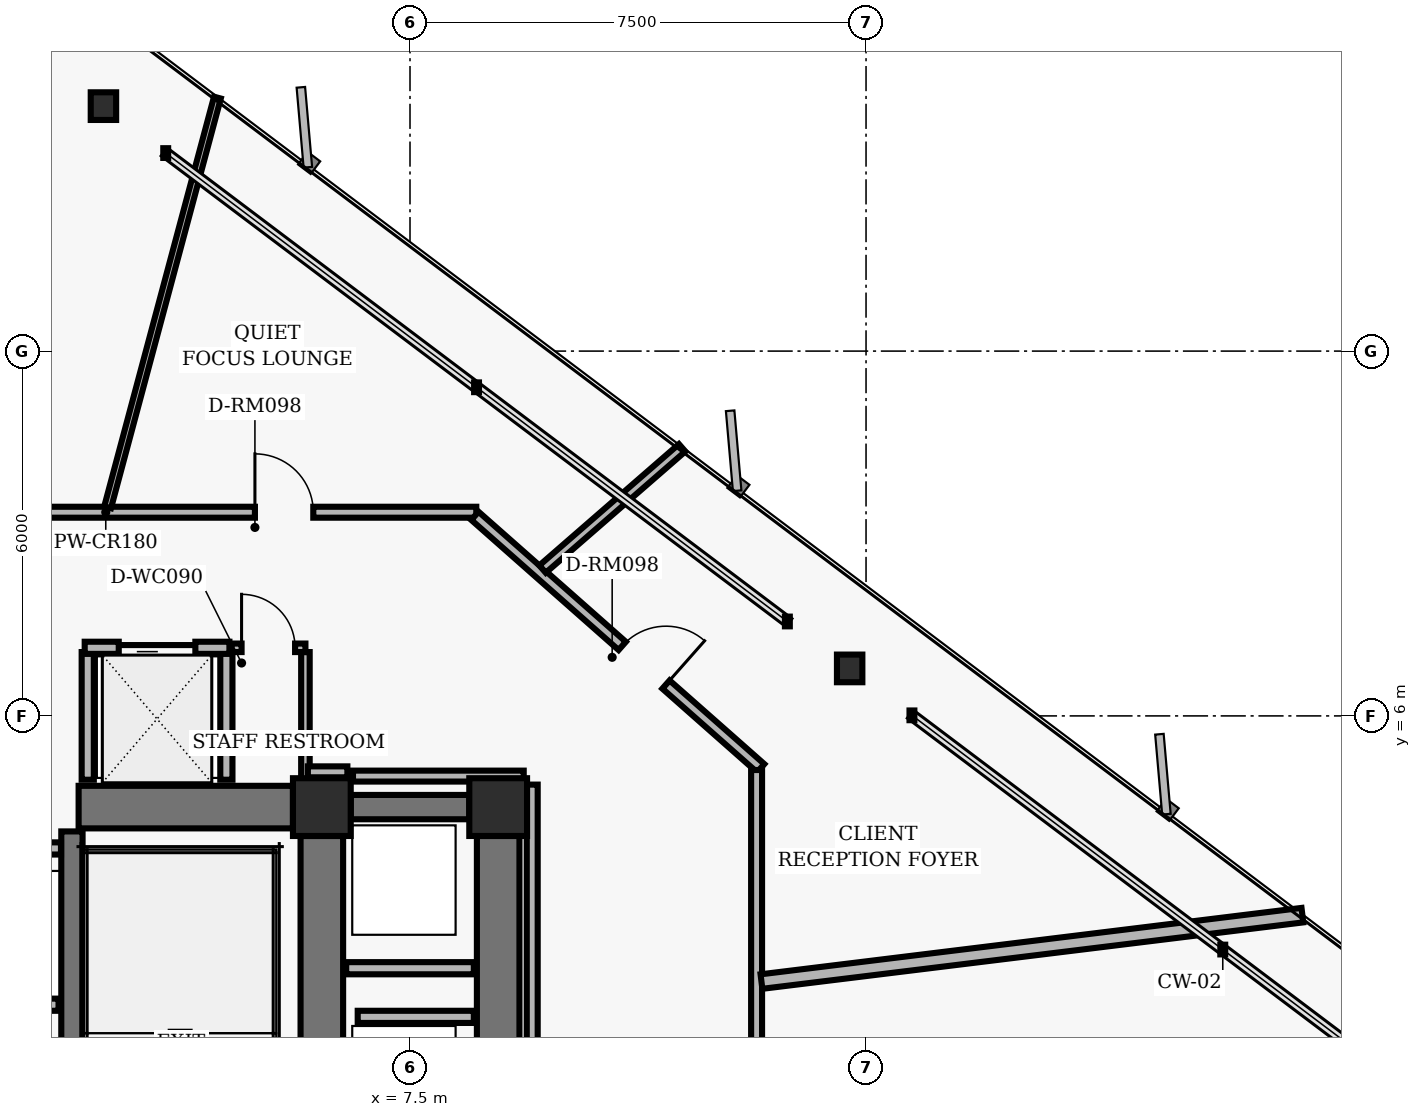
"""IFC4 building model, lengths in metres.
Left out: names, types, materials, properties, quantities, classifications, styles, units other than length and angle.
Written with IfcOpenShell. Run it as: python <this file> out.ifc"""

import sys

from ifc_helpers import new_model, si_unit, direction, frame, frame_2d, origin, origin_2d, place, context, subcontext, project, spatial, rectangle, hollow_rectangle, i_section, extrude, element, fill, save


model = new_model("IFC4")
c1 = context("Model", 3, precision=1e-05, world=origin(), true_north=direction((0.0, 1.0)))
c2 = subcontext(c1, "Body", "Model", "MODEL_VIEW")
j1 = project(units=[si_unit("LENGTHUNIT", "METRE"), si_unit("PLANEANGLEUNIT", "RADIAN")], contexts=[c1])
p1 = place(None, origin())
s1 = spatial("IfcSite", under=j1, at=p1, CompositionType="ELEMENT")
p2 = place(p1, origin())
s2 = spatial("IfcBuilding", under=s1, at=p2, CompositionType="ELEMENT")
p3 = place(p2, frame((0.0, 0.0, 63.04)))
s3 = spatial("IfcBuildingStorey", under=s2, at=p3, CompositionType="ELEMENT", Elevation=63.04)
for number, where, z_axis, x_axis in (
    (1, (6.05, 4.5, 0.0), (0.0, 0.0, 1.0), (1.0, 0.0, 0.0)),
    (2, (8.95, 4.5, 0.0), (0.0, 0.0, 1.0), (1.0, 0.0, 0.0)),
):
    element("IfcColumn", number, at=place(p3, frame(where, z_axis=z_axis, x_axis=x_axis)), inside=s3, PredefinedType="COLUMN", context=c2, shape_type="SweptSolid", body=[
        extrude(hollow_rectangle(XDim=0.95, YDim=0.95, WallThickness=0.06, InnerFilletRadius=0.02, OuterFilletRadius=0.04, at=origin_2d()), origin(), (0.0, 0.0, 1.0), 3.36),
    ])
p4 = place(p3, frame((6.05, 0.475, 0.0), z_axis=(0.0, 0.0, 1.0), x_axis=(0.0, 1.0, 0.0)))
e3 = element("IfcWall", 3, at=p4, inside=s3, PredefinedType="SHEAR", context=c2, shape_type="SweptSolid", body=[
    extrude(rectangle(XDim=3.55, YDim=0.7, at=frame_2d((1.775, 0.0))), origin(), (0.0, 0.0, 1.0), 3.098),
])
p5 = place(p3, frame((1.94, -4.1, 0.0), z_axis=(0.0, 0.0, 1.0), x_axis=(0.0, 1.0, 0.0)))
e4 = element("IfcWall", 4, at=p5, inside=s3, PredefinedType="SHEAR", context=c2, shape_type="SweptSolid", body=[
    extrude(rectangle(XDim=8.2, YDim=0.35, at=frame_2d((4.1, 0.0))), origin(), (0.0, 0.0, 1.0), 3.098),
])
p6 = place(p3, frame((2.05, 4.5, 0.0), z_axis=(0.0, 0.0, 1.0), x_axis=(1.0, 0.0, 0.0)))
e5 = element("IfcWall", 5, at=p6, inside=s3, PredefinedType="SHEAR", context=c2, shape_type="SweptSolid", body=[
    extrude(rectangle(XDim=3.525, YDim=0.7, at=frame_2d((1.762, 0.0))), origin(), (0.0, 0.0, 1.0), 3.098),
])
p7 = place(p3, frame((8.95, -3.825, 0.0), z_axis=(0.0, 0.0, 1.0), x_axis=(0.0, 1.0, 0.0)))
e6 = element("IfcWall", 6, at=p7, inside=s3, PredefinedType="SHEAR", context=c2, shape_type="SweptSolid", body=[
    extrude(rectangle(XDim=7.85, YDim=0.7, at=frame_2d((3.925, 0.0))), origin(), (0.0, 0.0, 1.0), 3.098),
])
p8 = place(p3, frame((6.525, 4.5, 0.0), z_axis=(0.0, 0.0, 1.0), x_axis=(1.0, 0.0, 0.0)))
e7 = element("IfcWall", 7, at=p8, inside=s3, PredefinedType="SHEAR", context=c2, shape_type="SweptSolid", body=[
    extrude(rectangle(XDim=1.95, YDim=0.4, at=frame_2d((0.975, 0.0))), origin(), (0.0, 0.0, 1.0), 3.098),
])
for number, where, z_axis, x_axis in (
    (8, (14.73, 6.781, 0.0), (0.0, 0.0, 1.0), (1.0, 0.0, 0.0)),
    (9, (2.458, 16.029, 0.0), (0.0, 0.0, 1.0), (1.0, 0.0, 0.0)),
):
    element("IfcColumn", number, at=place(p3, frame(where, z_axis=z_axis, x_axis=x_axis)), inside=s3, PredefinedType="COLUMN", context=c2, shape_type="SweptSolid", body=[
        extrude(i_section(OverallWidth=0.418, OverallDepth=0.455, WebThickness=0.042, FlangeThickness=0.068, FilletRadius=0.025, at=origin_2d()), origin(), (0.0, 0.0, 1.0), 3.36),
    ])
p9 = place(p3, frame((-1.72, 1.25, 0.0), z_axis=(0.0, 0.0, 1.0), x_axis=(1.0, 0.0, 0.0)))
e10 = element("IfcWall", 10, at=p9, inside=s3, PredefinedType="PARTITIONING", context=c2, shape_type="SweptSolid", body=[
    extrude(rectangle(XDim=3.44, YDim=0.2, at=frame_2d((1.72, 0.0))), origin(), (0.0, 0.0, 1.0), 3.073),
])
p10 = place(p3, frame((-1.76, 3.82, 0.0), z_axis=(0.0, 0.0, 1.0), x_axis=(1.0, 0.0, 0.0)))
e11 = element("IfcWall", 11, at=p10, inside=s3, PredefinedType="PARTITIONING", context=c2, shape_type="SweptSolid", body=[
    extrude(rectangle(XDim=3.52, YDim=0.2, at=frame_2d((1.76, 0.0))), origin(), (0.0, 0.0, 1.0), 3.073),
])
for number, where, z_axis, x_axis in (
    (12, (2.2, 4.95, 0.0), (0.0, 0.0, 1.0), (0.0, 1.0, 0.0)),
    (13, (4.48, 4.95, 0.0), (0.0, 0.0, 1.0), (0.0, 1.0, 0.0)),
):
    element("IfcWall", number, at=place(p3, frame(where, z_axis=z_axis, x_axis=x_axis)), inside=s3, PredefinedType="PARTITIONING", context=c2, shape_type="SweptSolid", body=[
        extrude(rectangle(XDim=2.1, YDim=0.2, at=frame_2d((1.05, 0.0))), origin(), (0.0, 0.0, 1.0), 3.073),
    ])
p11 = place(p3, frame((2.15, 7.12, 0.0), z_axis=(0.0, 0.0, 1.0), x_axis=(1.0, 0.0, 0.0)))
e14 = element("IfcWall", 14, at=p11, inside=s3, PredefinedType="PARTITIONING", context=c2, shape_type="SweptSolid", body=[
    extrude(rectangle(XDim=2.38, YDim=0.2, at=frame_2d((1.19, 0.0))), origin(), (0.0, 0.0, 1.0), 2.587),
])
p12 = place(p11, frame((0.56, 0.0, 0.0)))
e15 = element("IfcOpeningElement", 15, at=p12, cuts=e14, PredefinedType="OPENING", context=c2, shape_type="SweptSolid", body=[
    extrude(rectangle(XDim=1.26, YDim=2.06, at=frame_2d((0.63, 1.03))), frame((0.0, 0.11, 0.0), z_axis=(0.0, -1.0, 0.0), x_axis=(1.0, 0.0, 0.0)), (0.0, 0.0, 1.0), 0.22),
])
p13 = place(p3, frame((5.78, 4.95, 0.0), z_axis=(0.0, 0.0, 1.0), x_axis=(0.0, 1.0, 0.0)))
e16 = element("IfcWall", 16, at=p13, inside=s3, PredefinedType="PARTITIONING", context=c2, shape_type="SweptSolid", body=[
    extrude(rectangle(XDim=2.1, YDim=0.14, at=frame_2d((1.05, 0.0))), origin(), (0.0, 0.0, 1.0), 3.073),
])
p14 = place(p3, frame((4.56, 7.12, 0.0), z_axis=(0.0, 0.0, 1.0), x_axis=(1.0, 0.0, 0.0)))
e17 = element("IfcWall", 17, at=p14, inside=s3, PredefinedType="PARTITIONING", context=c2, shape_type="SweptSolid", body=[
    extrude(rectangle(XDim=1.22, YDim=0.14, at=frame_2d((0.61, 0.0))), origin(), (0.0, 0.0, 1.0), 2.587),
])
p15 = place(p14, frame((0.17, 0.0, 0.0)))
e18 = element("IfcOpeningElement", 18, at=p15, cuts=e17, PredefinedType="OPENING", context=c2, shape_type="SweptSolid", body=[
    extrude(rectangle(XDim=0.88, YDim=2.02, at=frame_2d((0.44, 1.01))), frame((0.0, 0.08, 0.0), z_axis=(0.0, -1.0, 0.0), x_axis=(1.0, 0.0, 0.0)), (0.0, 0.0, 1.0), 0.16),
])
p16 = place(p3, frame((6.45, 1.85, 0.0), z_axis=(0.0, 0.0, 1.0), x_axis=(1.0, 0.0, 0.0)))
e19 = element("IfcWall", 19, at=p16, inside=s3, PredefinedType="PARTITIONING", context=c2, shape_type="SweptSolid", body=[
    extrude(rectangle(XDim=2.1, YDim=0.2, at=frame_2d((1.05, 0.0))), origin(), (0.0, 0.0, 1.0), 3.073),
])
p17 = place(p3, frame((6.64, 1.05, 0.0), z_axis=(0.0, 0.0, 1.0), x_axis=(1.0, 0.0, 0.0)))
e20 = element("IfcWall", 20, at=p17, inside=s3, PredefinedType="PARTITIONING", context=c2, shape_type="SweptSolid", body=[
    extrude(rectangle(XDim=1.91, YDim=0.2, at=frame_2d((0.955, 0.0))), origin(), (0.0, 0.0, 1.0), 3.073),
])
p18 = place(p3, frame((-8.59, 9.35, 0.0), z_axis=(0.0, 0.0, 1.0), x_axis=(1.0, 0.0, 0.0)))
e21 = element("IfcWall", 21, at=p18, inside=s3, PredefinedType="PARTITIONING", context=c2, shape_type="SweptSolid", body=[
    extrude(rectangle(XDim=17.18, YDim=0.18, at=frame_2d((8.59, 0.0))), origin(), (0.0, 0.0, 1.0), 3.073),
])
p19 = place(p18, frame((13.54, 0.0, 0.0)))
e22 = element("IfcOpeningElement", 22, at=p19, cuts=e21, PredefinedType="OPENING", context=c2, shape_type="SweptSolid", body=[
    extrude(rectangle(XDim=0.96, YDim=2.02, at=frame_2d((0.48, 1.01))), frame((0.0, 0.1, 0.0), z_axis=(0.0, -1.0, 0.0), x_axis=(1.0, 0.0, 0.0)), (0.0, 0.0, 1.0), 0.2),
])
p20 = place(p18, frame((7.453, 0.0, 0.0)))
e23 = element("IfcOpeningElement", 23, at=p20, cuts=e21, PredefinedType="OPENING", context=c2, shape_type="SweptSolid", body=[
    extrude(rectangle(XDim=1.18, YDim=2.02, at=frame_2d((0.59, 1.01))), frame((0.0, 0.1, 0.0), z_axis=(0.0, -1.0, 0.0), x_axis=(1.0, 0.0, 0.0)), (0.0, 0.0, 1.0), 0.2),
])
p21 = place(p18, frame((2.133, 0.0, 0.0)))
e24 = element("IfcOpeningElement", 24, at=p21, cuts=e21, PredefinedType="OPENING", context=c2, shape_type="SweptSolid", body=[
    extrude(rectangle(XDim=0.96, YDim=2.02, at=frame_2d((0.48, 1.01))), frame((0.0, 0.1, 0.0), z_axis=(0.0, -1.0, 0.0), x_axis=(1.0, 0.0, 0.0)), (0.0, 0.0, 1.0), 0.2),
])
p22 = place(p3, frame((8.567, 9.29, 0.0), z_axis=(0.0, 0.0, 1.0), x_axis=(0.749626463267, -0.66186113768, 0.0)))
e25 = element("IfcWall", 25, at=p22, inside=s3, PredefinedType="PARTITIONING", context=c2, shape_type="SweptSolid", body=[
    extrude(rectangle(XDim=6.27, YDim=0.18, at=frame_2d((3.135, 0.0))), origin(), (0.0, 0.0, 1.0), 2.587),
])
p23 = place(p22, frame((3.232, 0.0, 0.0)))
e26 = element("IfcOpeningElement", 26, at=p23, cuts=e25, PredefinedType="OPENING", context=c2, shape_type="SweptSolid", body=[
    extrude(rectangle(XDim=0.96, YDim=2.02, at=frame_2d((0.48, 1.01))), frame((0.0, 0.1, 0.0), z_axis=(0.0, -1.0, 0.0), x_axis=(1.0, 0.0, 0.0)), (0.0, 0.0, 1.0), 0.2),
])
p24 = place(p3, frame((13.2, 5.11, 0.0), z_axis=(0.0, 0.0, 1.0), x_axis=(0.0, -1.0, 0.0)))
e27 = element("IfcWall", 27, at=p24, inside=s3, PredefinedType="PARTITIONING", context=c2, shape_type="SweptSolid", body=[
    extrude(rectangle(XDim=10.22, YDim=0.18, at=frame_2d((5.11, 0.0))), origin(), (0.0, 0.0, 1.0), 3.073),
])
p25 = place(p24, frame((6.21, 0.0, 0.0)))
e28 = element("IfcOpeningElement", 28, at=p25, cuts=e27, PredefinedType="OPENING", context=c2, shape_type="SweptSolid", body=[
    extrude(rectangle(XDim=1.02, YDim=2.02, at=frame_2d((0.51, 1.01))), frame((0.0, 0.1, 0.0), z_axis=(0.0, -1.0, 0.0), x_axis=(1.0, 0.0, 0.0)), (0.0, 0.0, 1.0), 0.2),
])
p26 = place(p3, frame((9.51, -4.87, 0.0), z_axis=(0.0, 0.0, 1.0), x_axis=(0.0, 1.0, 0.0)))
e29 = element("IfcWall", 29, at=p26, inside=s3, PredefinedType="PARTITIONING", context=c2, shape_type="SweptSolid", body=[
    extrude(rectangle(XDim=9.74, YDim=0.18, at=frame_2d((4.87, 0.0))), origin(), (0.0, 0.0, 1.0), 3.073),
])
p27 = place(p3, frame((9.37, 5.01, 0.0), z_axis=(0.0, 0.0, 1.0), x_axis=(-1.0, 0.0, 0.0)))
e30 = element("IfcWall", 30, at=p27, inside=s3, PredefinedType="PARTITIONING", context=c2, shape_type="SweptSolid", body=[
    extrude(rectangle(XDim=2.808, YDim=0.18, at=frame_2d((1.404, 0.0))), origin(), (0.0, 0.0, 1.0), 3.073),
])
p28 = place(p3, frame((6.47, 5.08, 0.0), z_axis=(0.0, 0.0, 1.0), x_axis=(-1.0, 0.0, 0.0)))
e31 = element("IfcWall", 31, at=p28, inside=s3, PredefinedType="PARTITIONING", context=c2, shape_type="SweptSolid", body=[
    extrude(rectangle(XDim=0.65, YDim=0.18, at=frame_2d((0.325, 0.0))), origin(), (0.0, 0.0, 1.0), 3.073),
])
p29 = place(p3, frame((13.28, 1.631, 0.0), z_axis=(0.0, 0.0, 1.0), x_axis=(0.992547039209, 0.121862114529, 0.0)))
e32 = element("IfcWall", 32, at=p29, inside=s3, PredefinedType="PARTITIONING", context=c2, shape_type="SweptSolid", body=[
    extrude(rectangle(XDim=8.963, YDim=0.24, at=frame_2d((4.482, 0.0))), origin(), (0.0, 0.0, 1.0), 3.073),
])
p30 = place(p3, frame((9.68, 8.415, 0.0), z_axis=(0.0, 0.0, 1.0), x_axis=(0.754716123846, 0.656051501337, 0.0)))
e33 = element("IfcWall", 33, at=p30, inside=s3, PredefinedType="PARTITIONING", context=c2, shape_type="SweptSolid", body=[
    extrude(rectangle(XDim=3.041, YDim=0.16, at=frame_2d((1.521, 0.0))), origin(), (0.0, 0.0, 1.0), 3.073),
])
p31 = place(p3, frame((2.527, 9.43, 0.0), z_axis=(0.0, 0.0, 1.0), x_axis=(0.258803716415, 0.965929933468, 0.0)))
e34 = element("IfcWall", 34, at=p31, inside=s3, PredefinedType="MOVABLE", context=c2, shape_type="SweptSolid", body=[
    extrude(rectangle(XDim=6.977, YDim=0.115, at=frame_2d((3.489, 0.0))), origin(), (0.0, 0.0, 1.0), 3.073),
])
p32 = place(p12, origin())
e35 = element("IfcDoor", 35, at=p32, inside=s3, OperationType="SLIDING_TO_LEFT", PredefinedType="DOOR", context=c2, shape_type="SweptSolid", body=[
    extrude(rectangle(XDim=1.26, YDim=2.06, at=frame_2d((0.63, 1.03))), frame((0.0, 0.025, 0.0), z_axis=(0.0, -1.0, 0.0), x_axis=(1.0, 0.0, 0.0)), (0.0, 0.0, 1.0), 0.05),
])
fill(e15, e35)
p33 = place(p15, origin())
e36 = element("IfcDoor", 36, at=p33, inside=s3, OperationType="SINGLE_SWING_LEFT", PredefinedType="DOOR", context=c2, shape_type="SweptSolid", body=[
    extrude(rectangle(XDim=0.88, YDim=2.02, at=frame_2d((0.44, 1.01))), frame((0.0, 0.025, 0.0), z_axis=(0.0, -1.0, 0.0), x_axis=(1.0, 0.0, 0.0)), (0.0, 0.0, 1.0), 0.05),
])
fill(e18, e36)
p34 = place(p23, origin())
e37 = element("IfcDoor", 37, at=p34, inside=s3, OperationType="SINGLE_SWING_RIGHT", PredefinedType="DOOR", context=c2, shape_type="SweptSolid", body=[
    extrude(rectangle(XDim=0.96, YDim=2.02, at=frame_2d((0.48, 1.01))), frame((0.0, 0.025, 0.0), z_axis=(0.0, -1.0, 0.0), x_axis=(1.0, 0.0, 0.0)), (0.0, 0.0, 1.0), 0.05),
])
fill(e26, e37)
p35 = place(p19, origin())
e38 = element("IfcDoor", 38, at=p35, inside=s3, OperationType="SINGLE_SWING_LEFT", PredefinedType="DOOR", context=c2, shape_type="SweptSolid", body=[
    extrude(rectangle(XDim=0.96, YDim=2.02, at=frame_2d((0.48, 1.01))), frame((0.0, 0.025, 0.0), z_axis=(0.0, -1.0, 0.0), x_axis=(1.0, 0.0, 0.0)), (0.0, 0.0, 1.0), 0.05),
])
fill(e22, e38)
save(model, sys.argv[1])
